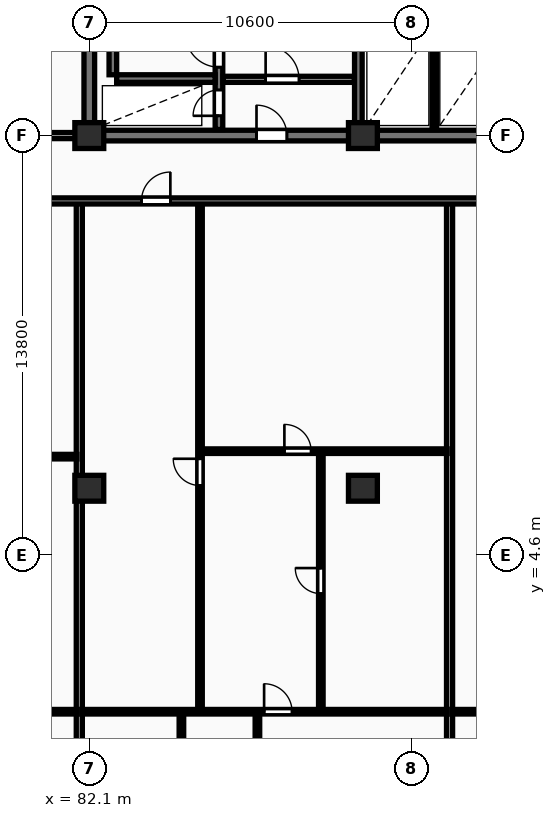
"""IFC4 building model, lengths in metres.
Left out: names, types, materials, properties, quantities, classifications, styles, units other than length and angle.
Written with IfcOpenShell. Run it as: python <this file> out.ifc"""

import sys

from ifc_helpers import new_model, si_unit, direction, frame, frame_2d, origin, origin_2d, place, context, subcontext, project, spatial, rectangle, extrude, element, fill, save


model = new_model("IFC4")
c1 = context("Model", 3, precision=1e-05, world=origin(), true_north=direction((0.0, 1.0)))
c2 = subcontext(c1, "Body", "Model", "MODEL_VIEW")
j1 = project(units=[si_unit("LENGTHUNIT", "METRE"), si_unit("PLANEANGLEUNIT", "RADIAN")], contexts=[c1])
p1 = place(None, origin())
s1 = spatial("IfcSite", under=j1, at=p1, CompositionType="ELEMENT")
p2 = place(p1, origin())
s2 = spatial("IfcBuilding", under=s1, at=p2, CompositionType="ELEMENT")
p3 = place(p2, frame((0.0, 0.0, 24.0)))
s3 = spatial("IfcBuildingStorey", under=s2, at=p3, CompositionType="ELEMENT", Elevation=24.0)
for number, where, z_axis, x_axis in (
    (1, (82.1, 6.8, 0.0), (0.0, 0.0, 1.0), (1.0, 0.0, 0.0)),
    (2, (82.1, 18.4, 0.0), (0.0, 0.0, 1.0), (1.0, 0.0, 0.0)),
    (3, (91.1, 6.8, 0.0), (0.0, 0.0, 1.0), (1.0, 0.0, 0.0)),
    (4, (91.1, 18.4, 0.0), (0.0, 0.0, 1.0), (1.0, 0.0, 0.0)),
):
    element("IfcColumn", number, at=place(p3, frame(where, z_axis=z_axis, x_axis=x_axis)), inside=s3, PredefinedType="COLUMN", context=c2, shape_type="SweptSolid", body=[
        extrude(rectangle(XDim=0.95, YDim=0.85, at=origin_2d()), origin(), (0.0, 0.0, 1.0), 3.25),
    ])
p4 = place(p3, frame((82.1, 18.575, 0.0), z_axis=(0.0, 0.0, 1.0), x_axis=(0.0, 1.0, 0.0)))
e5 = element("IfcWall", 5, at=p4, inside=s3, PredefinedType="SHEAR", context=c2, shape_type="SweptSolid", body=[
    extrude(rectangle(XDim=11.65, YDim=0.35, at=frame_2d((5.825, 0.0))), origin(), (0.0, 0.0, 1.0), 3.25),
])
p5 = place(p3, frame((81.925, 18.4, 0.0), z_axis=(0.0, 0.0, 1.0), x_axis=(1.0, 0.0, 0.0)))
e6 = element("IfcWall", 6, at=p5, inside=s3, PredefinedType="SHEAR", context=c2, shape_type="SweptSolid", body=[
    extrude(rectangle(XDim=36.265, YDim=0.35, at=frame_2d((18.132, 0.0))), origin(), (0.0, 0.0, 1.0), 3.25),
])
p6 = place(p5, frame((5.675, 0.0, 0.0)))
e7 = element("IfcOpeningElement", 7, at=p6, cuts=e6, PredefinedType="OPENING", context=c2, shape_type="SweptSolid", body=[
    extrude(rectangle(XDim=1.0, YDim=2.15, at=frame_2d((0.5, 1.075))), frame((0.0, 0.185, 0.0), z_axis=(0.0, -1.0, 0.0), x_axis=(1.0, 0.0, 0.0)), (0.0, 0.0, 1.0), 0.37),
])
p7 = place(p5, frame((21.925, 0.0, 0.0)))
e8 = element("IfcOpeningElement", 8, at=p7, cuts=e6, PredefinedType="OPENING", context=c2, shape_type="SweptSolid", body=[
    extrude(rectangle(XDim=1.5, YDim=2.2, at=frame_2d((0.75, 1.1))), frame((0.0, 0.185, 0.0), z_axis=(0.0, -1.0, 0.0), x_axis=(1.0, 0.0, 0.0)), (0.0, 0.0, 1.0), 0.37),
])
p8 = place(p5, frame((29.875, 0.0, 0.0)))
e9 = element("IfcOpeningElement", 9, at=p8, cuts=e6, PredefinedType="OPENING", context=c2, shape_type="SweptSolid", body=[
    extrude(rectangle(XDim=1.0, YDim=2.15, at=frame_2d((0.5, 1.075))), frame((0.0, 0.185, 0.0), z_axis=(0.0, -1.0, 0.0), x_axis=(1.0, 0.0, 0.0)), (0.0, 0.0, 1.0), 0.37),
])
p9 = place(p3, frame((82.875, 20.4, 0.0), z_axis=(0.0, 0.0, 1.0), x_axis=(0.0, 1.0, 0.0)))
e10 = element("IfcWall", 10, at=p9, inside=s3, PredefinedType="SHEAR", context=c2, shape_type="SweptSolid", body=[
    extrude(rectangle(XDim=7.6, YDim=0.25, at=frame_2d((3.8, 0.0))), origin(), (0.0, 0.0, 1.0), 3.25),
])
p10 = place(p3, frame((86.365, 18.6, 0.0), z_axis=(0.0, 0.0, 1.0), x_axis=(0.0, 1.0, 0.0)))
e11 = element("IfcWall", 11, at=p10, inside=s3, PredefinedType="SHEAR", context=c2, shape_type="SweptSolid", body=[
    extrude(rectangle(XDim=11.6, YDim=0.25, at=frame_2d((5.8, 0.0))), origin(), (0.0, 0.0, 1.0), 3.25),
])
p11 = place(p10, frame((0.45, 0.0, 0.0)))
e12 = element("IfcOpeningElement", 12, at=p11, cuts=e11, PredefinedType="OPENING", context=c2, shape_type="SweptSolid", body=[
    extrude(rectangle(XDim=0.85, YDim=2.05, at=frame_2d((0.425, 1.025))), frame((0.0, 0.135, 0.0), z_axis=(0.0, -1.0, 0.0), x_axis=(1.0, 0.0, 0.0)), (0.0, 0.0, 1.0), 0.27),
])
p12 = place(p10, frame((2.05, 0.0, 0.0)))
e13 = element("IfcOpeningElement", 13, at=p12, cuts=e11, PredefinedType="OPENING", context=c2, shape_type="SweptSolid", body=[
    extrude(rectangle(XDim=1.1, YDim=2.1, at=frame_2d((0.55, 1.05))), frame((0.0, 0.135, 0.0), z_axis=(0.0, -1.0, 0.0), x_axis=(1.0, 0.0, 0.0)), (0.0, 0.0, 1.0), 0.27),
])
p13 = place(p10, frame((9.95, 0.0, 0.0)))
e14 = element("IfcOpeningElement", 14, at=p13, cuts=e11, PredefinedType="OPENING", context=c2, shape_type="SweptSolid", body=[
    extrude(rectangle(XDim=0.85, YDim=2.05, at=frame_2d((0.425, 1.025))), frame((0.0, 0.135, 0.0), z_axis=(0.0, -1.0, 0.0), x_axis=(1.0, 0.0, 0.0)), (0.0, 0.0, 1.0), 0.27),
])
p14 = place(p3, frame((83.0, 20.275, 0.0), z_axis=(0.0, 0.0, 1.0), x_axis=(1.0, 0.0, 0.0)))
e15 = element("IfcWall", 15, at=p14, inside=s3, PredefinedType="SHEAR", context=c2, shape_type="SweptSolid", body=[
    extrude(rectangle(XDim=3.24, YDim=0.25, at=frame_2d((1.62, 0.0))), origin(), (0.0, 0.0, 1.0), 3.25),
])
p15 = place(p3, frame((86.5, 20.25, 0.0), z_axis=(0.0, 0.0, 1.0), x_axis=(1.0, 0.0, 0.0)))
e16 = element("IfcWall", 16, at=p15, inside=s3, PredefinedType="PARTITIONING", context=c2, shape_type="SweptSolid", body=[
    extrude(rectangle(XDim=4.32, YDim=0.2, at=frame_2d((2.16, 0.0))), origin(), (0.0, 0.0, 1.0), 2.97),
])
p16 = place(p15, frame((1.4, 0.0, 0.0)))
e17 = element("IfcOpeningElement", 17, at=p16, cuts=e16, PredefinedType="OPENING", context=c2, shape_type="SweptSolid", body=[
    extrude(rectangle(XDim=1.1, YDim=2.1, at=frame_2d((0.55, 1.05))), frame((0.0, 0.11, 0.0), z_axis=(0.0, -1.0, 0.0), x_axis=(1.0, 0.0, 0.0)), (0.0, 0.0, 1.0), 0.22),
])
p17 = place(p3, frame((90.95, 18.6, 0.0), z_axis=(0.0, 0.0, 1.0), x_axis=(0.0, 1.0, 0.0)))
e18 = element("IfcWall", 18, at=p17, inside=s3, PredefinedType="SHEAR", context=c2, shape_type="SweptSolid", body=[
    extrude(rectangle(XDim=11.6, YDim=0.25, at=frame_2d((5.8, 0.0))), origin(), (0.0, 0.0, 1.0), 3.25),
])
p18 = place(p17, frame((4.6, 0.0, 0.0)))
e19 = element("IfcOpeningElement", 19, at=p18, cuts=e18, PredefinedType="OPENING", context=c2, shape_type="SweptSolid", body=[
    extrude(rectangle(XDim=1.1, YDim=2.1, at=frame_2d((0.55, 1.05))), frame((0.0, 0.135, 0.0), z_axis=(0.0, -1.0, 0.0), x_axis=(1.0, 0.0, 0.0)), (0.0, 0.0, 1.0), 0.27),
])
p19 = place(p3, frame((93.45, 18.6, 0.0), z_axis=(0.0, 0.0, 1.0), x_axis=(0.0, 1.0, 0.0)))
e20 = element("IfcWall", 20, at=p19, inside=s3, PredefinedType="PARTITIONING", context=c2, shape_type="SweptSolid", body=[
    extrude(rectangle(XDim=3.6, YDim=0.15, at=frame_2d((1.8, 0.0))), origin(), (0.0, 0.0, 1.0), 2.97),
])
p20 = place(p3, frame((70.7, 18.4, 0.0), z_axis=(0.0, 0.0, 1.0), x_axis=(1.0, 0.0, 0.0)))
e21 = element("IfcWall", 21, at=p20, inside=s3, PredefinedType="PARTITIONING", context=c2, shape_type="SweptSolid", body=[
    extrude(rectangle(XDim=11.25, YDim=0.2, at=frame_2d((5.625, 0.0))), origin(), (0.0, 0.0, 1.0), 2.37),
])
p21 = place(p20, frame((5.506, 0.0, 0.0)))
e22 = element("IfcOpeningElement", 22, at=p21, cuts=e21, PredefinedType="OPENING", context=c2, shape_type="SweptSolid", body=[
    extrude(rectangle(XDim=0.95, YDim=2.15, at=frame_2d((0.475, 1.075))), frame((0.0, 0.11, 0.0), z_axis=(0.0, -1.0, 0.0), x_axis=(1.0, 0.0, 0.0)), (0.0, 0.0, 1.0), 0.22),
])
p22 = place(p3, frame((81.771, -10.9, 0.0), z_axis=(0.0, 0.0, 1.0), x_axis=(0.0, 1.0, 0.0)))
e23 = element("IfcWall", 23, at=p22, inside=s3, PredefinedType="PARTITIONING", context=c2, shape_type="SweptSolid", body=[
    extrude(rectangle(XDim=27.07, YDim=0.2, at=frame_2d((13.535, 0.0))), origin(), (0.0, 0.0, 1.0), 2.22),
])
p23 = place(p3, frame((74.73, 7.84, 0.0), z_axis=(0.0, 0.0, 1.0), x_axis=(1.0, 0.0, 0.0)))
e24 = element("IfcWall", 24, at=p23, inside=s3, PredefinedType="PARTITIONING", context=c2, shape_type="SweptSolid", body=[
    extrude(rectangle(XDim=6.961, YDim=0.15, at=frame_2d((3.481, 0.0))), origin(), (0.0, 0.0, 1.0), 2.97),
])
p24 = place(p23, frame((3.041, 0.0, 0.0)))
e25 = element("IfcOpeningElement", 25, at=p24, cuts=e24, PredefinedType="OPENING", context=c2, shape_type="SweptSolid", body=[
    extrude(rectangle(XDim=0.88, YDim=2.06, at=frame_2d((0.44, 1.03))), frame((0.0, 0.085, 0.0), z_axis=(0.0, -1.0, 0.0), x_axis=(1.0, 0.0, 0.0)), (0.0, 0.0, 1.0), 0.17),
])
p25 = place(p3, frame((70.78, -0.55, 0.0), z_axis=(0.0, 0.0, 1.0), x_axis=(1.0, 0.0, 0.0)))
e26 = element("IfcWall", 26, at=p25, inside=s3, PredefinedType="PARTITIONING", context=c2, shape_type="SweptSolid", body=[
    extrude(rectangle(XDim=10.911, YDim=0.15, at=frame_2d((5.456, 0.0))), origin(), (0.0, 0.0, 1.0), 2.97),
])
p26 = place(p25, frame((4.996, 0.0, 0.0)))
e27 = element("IfcOpeningElement", 27, at=p26, cuts=e26, PredefinedType="OPENING", context=c2, shape_type="SweptSolid", body=[
    extrude(rectangle(XDim=0.92, YDim=2.08, at=frame_2d((0.46, 1.04))), frame((0.0, 0.085, 0.0), z_axis=(0.0, -1.0, 0.0), x_axis=(1.0, 0.0, 0.0)), (0.0, 0.0, 1.0), 0.17),
])
p27 = place(p3, frame((93.95, -10.9, 0.0), z_axis=(0.0, 0.0, 1.0), x_axis=(0.0, 1.0, 0.0)))
e28 = element("IfcWall", 28, at=p27, inside=s3, PredefinedType="PARTITIONING", context=c2, shape_type="SweptSolid", body=[
    extrude(rectangle(XDim=27.07, YDim=0.2, at=frame_2d((13.535, 0.0))), origin(), (0.0, 0.0, 1.0), 2.97),
])
p28 = place(p3, frame((89.716, -0.51, 0.0), z_axis=(0.0, 0.0, 1.0), x_axis=(0.0, 1.0, 0.0)))
e29 = element("IfcWall", 29, at=p28, inside=s3, PredefinedType="PARTITIONING", context=c2, shape_type="SweptSolid", body=[
    extrude(rectangle(XDim=8.53, YDim=0.15, at=frame_2d((4.265, 0.0))), origin(), (0.0, 0.0, 1.0), 2.97),
])
p29 = place(p28, frame((3.845, 0.0, 0.0)))
e30 = element("IfcOpeningElement", 30, at=p29, cuts=e29, PredefinedType="OPENING", context=c2, shape_type="SweptSolid", body=[
    extrude(rectangle(XDim=0.84, YDim=2.04, at=frame_2d((0.42, 1.02))), frame((0.0, 0.085, 0.0), z_axis=(0.0, -1.0, 0.0), x_axis=(1.0, 0.0, 0.0)), (0.0, 0.0, 1.0), 0.17),
])
p30 = place(p3, frame((85.802, 8.02, 0.0), z_axis=(0.0, 0.0, 1.0), x_axis=(1.0, 0.0, 0.0)))
e31 = element("IfcWall", 31, at=p30, inside=s3, PredefinedType="PARTITIONING", context=c2, shape_type="SweptSolid", body=[
    extrude(rectangle(XDim=8.069, YDim=0.15, at=frame_2d((4.034, 0.0))), origin(), (0.0, 0.0, 1.0), 2.97),
])
p31 = place(p30, frame((2.716, 0.0, 0.0)))
e32 = element("IfcOpeningElement", 32, at=p31, cuts=e31, PredefinedType="OPENING", context=c2, shape_type="SweptSolid", body=[
    extrude(rectangle(XDim=0.88, YDim=2.06, at=frame_2d((0.44, 1.03))), frame((0.0, 0.085, 0.0), z_axis=(0.0, -1.0, 0.0), x_axis=(1.0, 0.0, 0.0)), (0.0, 0.0, 1.0), 0.17),
])
p32 = place(p3, frame((85.741, -0.51, 0.0), z_axis=(0.0, 0.0, 1.0), x_axis=(0.0, 1.0, 0.0)))
e33 = element("IfcWall", 33, at=p32, inside=s3, PredefinedType="PARTITIONING", context=c2, shape_type="SweptSolid", body=[
    extrude(rectangle(XDim=16.7, YDim=0.15, at=frame_2d((8.35, 0.0))), origin(), (0.0, 0.0, 1.0), 2.97),
])
p33 = place(p32, frame((7.4, 0.0, 0.0)))
e34 = element("IfcOpeningElement", 34, at=p33, cuts=e33, PredefinedType="OPENING", context=c2, shape_type="SweptSolid", body=[
    extrude(rectangle(XDim=0.88, YDim=2.06, at=frame_2d((0.44, 1.03))), frame((0.0, 0.085, 0.0), z_axis=(0.0, -1.0, 0.0), x_axis=(1.0, 0.0, 0.0)), (0.0, 0.0, 1.0), 0.17),
])
p34 = place(p3, frame((85.13, -5.59, 0.0), z_axis=(0.0, 0.0, 1.0), x_axis=(0.0, 1.0, 0.0)))
e35 = element("IfcWall", 35, at=p34, inside=s3, PredefinedType="PARTITIONING", context=c2, shape_type="SweptSolid", body=[
    extrude(rectangle(XDim=5.0, YDim=0.15, at=frame_2d((2.5, 0.0))), origin(), (0.0, 0.0, 1.0), 2.97),
])
p35 = place(p34, frame((2.08, 0.0, 0.0)))
e36 = element("IfcOpeningElement", 36, at=p35, cuts=e35, PredefinedType="OPENING", context=c2, shape_type="SweptSolid", body=[
    extrude(rectangle(XDim=0.84, YDim=2.04, at=frame_2d((0.42, 1.02))), frame((0.0, 0.085, 0.0), z_axis=(0.0, -1.0, 0.0), x_axis=(1.0, 0.0, 0.0)), (0.0, 0.0, 1.0), 0.17),
])
p36 = place(p3, frame((87.63, -5.59, 0.0), z_axis=(0.0, 0.0, 1.0), x_axis=(0.0, 1.0, 0.0)))
e37 = element("IfcWall", 37, at=p36, inside=s3, PredefinedType="PARTITIONING", context=c2, shape_type="SweptSolid", body=[
    extrude(rectangle(XDim=5.0, YDim=0.15, at=frame_2d((2.5, 0.0))), origin(), (0.0, 0.0, 1.0), 2.97),
])
p37 = place(p36, frame((2.08, 0.0, 0.0)))
e38 = element("IfcOpeningElement", 38, at=p37, cuts=e37, PredefinedType="OPENING", context=c2, shape_type="SweptSolid", body=[
    extrude(rectangle(XDim=0.84, YDim=2.04, at=frame_2d((0.42, 1.02))), frame((0.0, 0.085, 0.0), z_axis=(0.0, -1.0, 0.0), x_axis=(1.0, 0.0, 0.0)), (0.0, 0.0, 1.0), 0.17),
])
p38 = place(p3, frame((81.851, -0.55, 0.0), z_axis=(0.0, 0.0, 1.0), x_axis=(1.0, 0.0, 0.0)))
e39 = element("IfcWall", 39, at=p38, inside=s3, PredefinedType="PARTITIONING", context=c2, shape_type="SweptSolid", body=[
    extrude(rectangle(XDim=12.019, YDim=0.15, at=frame_2d((6.009, 0.0))), origin(), (0.0, 0.0, 1.0), 2.97),
])
p39 = place(p38, frame((5.999, 0.0, 0.0)))
e40 = element("IfcOpeningElement", 40, at=p39, cuts=e39, PredefinedType="OPENING", context=c2, shape_type="SweptSolid", body=[
    extrude(rectangle(XDim=0.92, YDim=2.08, at=frame_2d((0.46, 1.04))), frame((0.0, 0.085, 0.0), z_axis=(0.0, -1.0, 0.0), x_axis=(1.0, 0.0, 0.0)), (0.0, 0.0, 1.0), 0.17),
])
p40 = place(p3, frame((94.03, -0.55, 0.0), z_axis=(0.0, 0.0, 1.0), x_axis=(1.0, 0.0, 0.0)))
e41 = element("IfcWall", 41, at=p40, inside=s3, PredefinedType="PARTITIONING", context=c2, shape_type="SweptSolid", body=[
    extrude(rectangle(XDim=10.911, YDim=0.15, at=frame_2d((5.456, 0.0))), origin(), (0.0, 0.0, 1.0), 2.97),
])
p41 = place(p40, frame((4.996, 0.0, 0.0)))
e42 = element("IfcOpeningElement", 42, at=p41, cuts=e41, PredefinedType="OPENING", context=c2, shape_type="SweptSolid", body=[
    extrude(rectangle(XDim=0.92, YDim=2.08, at=frame_2d((0.46, 1.04))), frame((0.0, 0.085, 0.0), z_axis=(0.0, -1.0, 0.0), x_axis=(1.0, 0.0, 0.0)), (0.0, 0.0, 1.0), 0.17),
])
p42 = place(p3, frame((70.7, 16.25, 0.0), z_axis=(0.0, 0.0, 1.0), x_axis=(1.0, 0.0, 0.0)))
e43 = element("IfcWall", 43, at=p42, inside=s3, PredefinedType="PARTITIONING", context=c2, shape_type="SweptSolid", body=[
    extrude(rectangle(XDim=62.0, YDim=0.2, at=frame_2d((31.0, 0.0))), origin(), (0.0, 0.0, 1.0), 2.97),
])
p43 = place(p42, frame((1.186, 0.0, 0.0)))
e44 = element("IfcOpeningElement", 44, at=p43, cuts=e43, PredefinedType="OPENING", context=c2, shape_type="SweptSolid", body=[
    extrude(rectangle(XDim=0.95, YDim=2.15, at=frame_2d((0.475, 1.075))), frame((0.0, 0.11, 0.0), z_axis=(0.0, -1.0, 0.0), x_axis=(1.0, 0.0, 0.0)), (0.0, 0.0, 1.0), 0.22),
])
p44 = place(p42, frame((13.116, 0.0, 0.0)))
e45 = element("IfcOpeningElement", 45, at=p44, cuts=e43, PredefinedType="OPENING", context=c2, shape_type="SweptSolid", body=[
    extrude(rectangle(XDim=0.95, YDim=2.15, at=frame_2d((0.475, 1.075))), frame((0.0, 0.11, 0.0), z_axis=(0.0, -1.0, 0.0), x_axis=(1.0, 0.0, 0.0)), (0.0, 0.0, 1.0), 0.22),
])
p45 = place(p42, frame((25.295, 0.0, 0.0)))
e46 = element("IfcOpeningElement", 46, at=p45, cuts=e43, PredefinedType="OPENING", context=c2, shape_type="SweptSolid", body=[
    extrude(rectangle(XDim=0.95, YDim=2.15, at=frame_2d((0.475, 1.075))), frame((0.0, 0.11, 0.0), z_axis=(0.0, -1.0, 0.0), x_axis=(1.0, 0.0, 0.0)), (0.0, 0.0, 1.0), 0.22),
])
p46 = place(p42, frame((35.747, 0.0, 0.0)))
e47 = element("IfcOpeningElement", 47, at=p46, cuts=e43, PredefinedType="OPENING", context=c2, shape_type="SweptSolid", body=[
    extrude(rectangle(XDim=0.95, YDim=2.15, at=frame_2d((0.475, 1.075))), frame((0.0, 0.11, 0.0), z_axis=(0.0, -1.0, 0.0), x_axis=(1.0, 0.0, 0.0)), (0.0, 0.0, 1.0), 0.22),
])
p47 = place(p42, frame((49.652, 0.0, 0.0)))
e48 = element("IfcOpeningElement", 48, at=p47, cuts=e43, PredefinedType="OPENING", context=c2, shape_type="SweptSolid", body=[
    extrude(rectangle(XDim=0.95, YDim=2.15, at=frame_2d((0.475, 1.075))), frame((0.0, 0.11, 0.0), z_axis=(0.0, -1.0, 0.0), x_axis=(1.0, 0.0, 0.0)), (0.0, 0.0, 1.0), 0.22),
])
p48 = place(p6, origin())
e49 = element("IfcDoor", 49, at=p48, inside=s3, OperationType="SINGLE_SWING_LEFT", PredefinedType="DOOR", context=c2, shape_type="SweptSolid", body=[
    extrude(rectangle(XDim=1.0, YDim=2.15, at=frame_2d((0.5, 1.075))), frame((0.0, 0.025, 0.0), z_axis=(0.0, -1.0, 0.0), x_axis=(1.0, 0.0, 0.0)), (0.0, 0.0, 1.0), 0.05),
])
fill(e7, e49)
p49 = place(p11, origin())
e50 = element("IfcDoor", 50, at=p49, inside=s3, OperationType="SINGLE_SWING_LEFT", PredefinedType="DOOR", context=c2, shape_type="SweptSolid", body=[
    extrude(rectangle(XDim=0.85, YDim=2.05, at=frame_2d((0.425, 1.025))), frame((0.0, 0.025, 0.0), z_axis=(0.0, -1.0, 0.0), x_axis=(1.0, 0.0, 0.0)), (0.0, 0.0, 1.0), 0.05),
])
fill(e12, e50)
p50 = place(p12, origin())
e51 = element("IfcDoor", 51, at=p50, inside=s3, OperationType="SINGLE_SWING_RIGHT", PredefinedType="DOOR", context=c2, shape_type="SweptSolid", body=[
    extrude(rectangle(XDim=1.1, YDim=2.1, at=frame_2d((0.55, 1.05))), frame((0.0, 0.025, 0.0), z_axis=(0.0, -1.0, 0.0), x_axis=(1.0, 0.0, 0.0)), (0.0, 0.0, 1.0), 0.05),
])
fill(e13, e51)
p51 = place(p16, origin())
e52 = element("IfcDoor", 52, at=p51, inside=s3, OperationType="SINGLE_SWING_LEFT", PredefinedType="DOOR", context=c2, shape_type="SweptSolid", body=[
    extrude(rectangle(XDim=1.1, YDim=2.1, at=frame_2d((0.55, 1.05))), frame((0.0, 0.025, 0.0), z_axis=(0.0, -1.0, 0.0), x_axis=(1.0, 0.0, 0.0)), (0.0, 0.0, 1.0), 0.05),
])
fill(e17, e52)
p52 = place(p29, origin())
e53 = element("IfcDoor", 53, at=p52, inside=s3, OperationType="SINGLE_SWING_RIGHT", PredefinedType="DOOR", context=c2, shape_type="SweptSolid", body=[
    extrude(rectangle(XDim=0.84, YDim=2.04, at=frame_2d((0.42, 1.02))), frame((0.0, 0.025, 0.0), z_axis=(0.0, -1.0, 0.0), x_axis=(1.0, 0.0, 0.0)), (0.0, 0.0, 1.0), 0.05),
])
fill(e30, e53)
p53 = place(p31, origin())
e54 = element("IfcDoor", 54, at=p53, inside=s3, OperationType="SINGLE_SWING_LEFT", PredefinedType="DOOR", context=c2, shape_type="SweptSolid", body=[
    extrude(rectangle(XDim=0.88, YDim=2.06, at=frame_2d((0.44, 1.03))), frame((0.0, 0.025, 0.0), z_axis=(0.0, -1.0, 0.0), x_axis=(1.0, 0.0, 0.0)), (0.0, 0.0, 1.0), 0.05),
])
fill(e32, e54)
p54 = place(p33, origin())
e55 = element("IfcDoor", 55, at=p54, inside=s3, OperationType="SINGLE_SWING_RIGHT", PredefinedType="DOOR", context=c2, shape_type="SweptSolid", body=[
    extrude(rectangle(XDim=0.88, YDim=2.06, at=frame_2d((0.44, 1.03))), frame((0.0, 0.025, 0.0), z_axis=(0.0, -1.0, 0.0), x_axis=(1.0, 0.0, 0.0)), (0.0, 0.0, 1.0), 0.05),
])
fill(e34, e55)
p55 = place(p39, origin())
e56 = element("IfcDoor", 56, at=p55, inside=s3, OperationType="SINGLE_SWING_LEFT", PredefinedType="DOOR", context=c2, shape_type="SweptSolid", body=[
    extrude(rectangle(XDim=0.92, YDim=2.08, at=frame_2d((0.46, 1.04))), frame((0.0, 0.025, 0.0), z_axis=(0.0, -1.0, 0.0), x_axis=(1.0, 0.0, 0.0)), (0.0, 0.0, 1.0), 0.05),
])
fill(e40, e56)
p56 = place(p44, origin())
e57 = element("IfcDoor", 57, at=p56, inside=s3, OperationType="SINGLE_SWING_RIGHT", PredefinedType="DOOR", context=c2, shape_type="SweptSolid", body=[
    extrude(rectangle(XDim=0.95, YDim=2.15, at=frame_2d((0.475, 1.075))), frame((0.0, 0.025, 0.0), z_axis=(0.0, -1.0, 0.0), x_axis=(1.0, 0.0, 0.0)), (0.0, 0.0, 1.0), 0.05),
])
fill(e45, e57)
save(model, sys.argv[1])
